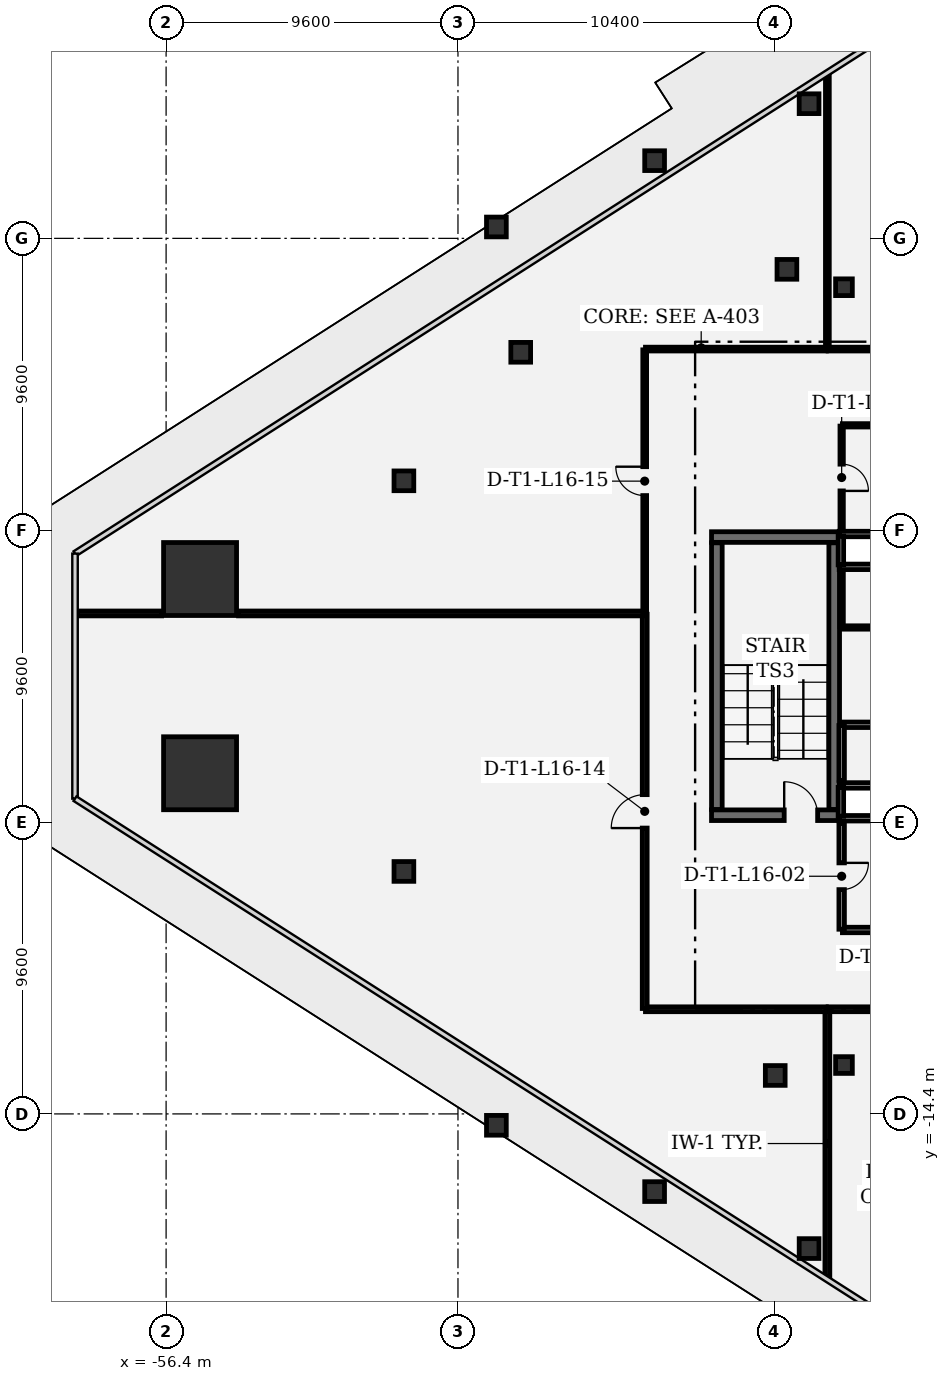
"""IFC4 building model, lengths in metres.
Left out: names, types, materials, properties, quantities, classifications, styles, units other than length and angle.
Written with IfcOpenShell. Run it as: python <this file> out.ifc"""

import sys

from ifc_helpers import new_model, si_unit, direction, frame, frame_2d, origin, origin_2d, place, context, subcontext, project, spatial, rectangle, extrude, element, fill, save


model = new_model("IFC4")
c1 = context("Model", 3, precision=1e-05, world=origin(), true_north=direction((0.0, 1.0)))
c2 = subcontext(c1, "Body", "Model", "MODEL_VIEW")
j1 = project(units=[si_unit("LENGTHUNIT", "METRE"), si_unit("PLANEANGLEUNIT", "RADIAN")], contexts=[c1])
p1 = place(None, origin())
s1 = spatial("IfcSite", under=j1, at=p1, CompositionType="ELEMENT")
p2 = place(p1, origin())
s2 = spatial("IfcBuilding", under=s1, at=p2, CompositionType="ELEMENT")
p3 = place(p2, frame((0.0, 0.0, 74.4)))
s3 = spatial("IfcBuildingStorey", under=s2, at=p3, CompositionType="ELEMENT", Elevation=74.4)
for number, where, z_axis, x_axis in (
    (1, (-55.283, 3.195, 0.0), (0.0, 0.0, 1.0), (1.0, 0.0, 0.0)),
    (2, (-55.283, -3.195, 0.0), (0.0, 0.0, 1.0), (1.0, 0.0, 0.0)),
):
    element("IfcColumn", number, at=place(p3, frame(where, z_axis=z_axis, x_axis=x_axis)), inside=s3, PredefinedType="COLUMN", context=c2, shape_type="SweptSolid", body=[
        extrude(rectangle(XDim=2.4, YDim=2.4, at=origin_2d()), origin(), (0.0, 0.0, 1.0), 4.2),
    ])
for number, where, z_axis, x_axis in (
    (3, (-45.536, 14.775, 0.0), (0.0, 0.0, 1.0), (1.0, 0.0, 0.0)),
    (4, (-45.536, -14.775, 0.0), (0.0, 0.0, 1.0), (1.0, 0.0, 0.0)),
    (5, (-40.333, 16.956, 0.0), (0.0, 0.0, 1.0), (1.0, 0.0, 0.0)),
    (6, (-40.333, -16.956, 0.0), (0.0, 0.0, 1.0), (1.0, 0.0, 0.0)),
    (7, (-35.252, 18.829, 0.0), (0.0, 0.0, 1.0), (1.0, 0.0, 0.0)),
    (8, (-35.252, -18.829, 0.0), (0.0, 0.0, 1.0), (1.0, 0.0, 0.0)),
    (9, (-44.736, 10.652, 0.0), (0.0, 0.0, 1.0), (1.0, 0.0, 0.0)),
    (10, (-48.578, 6.425, 0.0), (0.0, 0.0, 1.0), (1.0, 0.0, 0.0)),
    (11, (-48.578, -6.425, 0.0), (0.0, 0.0, 1.0), (1.0, 0.0, 0.0)),
    (12, (-35.981, 13.381, 0.0), (0.0, 0.0, 1.0), (1.0, 0.0, 0.0)),
    (13, (-36.365, -13.135, 0.0), (0.0, 0.0, 1.0), (1.0, 0.0, 0.0)),
):
    element("IfcColumn", number, at=place(p3, frame(where, z_axis=z_axis, x_axis=x_axis)), inside=s3, PredefinedType="COLUMN", context=c2, shape_type="SweptSolid", body=[
        extrude(rectangle(XDim=0.65, YDim=0.65, at=origin_2d()), origin(), (0.0, 0.0, 1.0), 4.2),
    ])
for number, where, z_axis, x_axis in (
    (14, (-34.104, 12.792, 0.0), (0.0, 0.0, 1.0), (1.0, 0.0, 0.0)),
    (15, (-34.104, -12.792, 0.0), (0.0, 0.0, 1.0), (1.0, 0.0, 0.0)),
):
    element("IfcColumn", number, at=place(p3, frame(where, z_axis=z_axis, x_axis=x_axis)), inside=s3, PredefinedType="COLUMN", context=c2, shape_type="SweptSolid", body=[
        extrude(rectangle(XDim=0.55, YDim=0.55, at=origin_2d()), origin(), (0.0, 0.0, 1.0), 4.2),
    ])
p4 = place(p3, frame((-38.46, -4.575, 0.0), z_axis=(0.0, 0.0, 1.0), x_axis=(1.0, 0.0, 0.0)))
e16 = element("IfcWall", 16, at=p4, inside=s3, PredefinedType="SHEAR", context=c2, shape_type="SweptSolid", body=[
    extrude(rectangle(XDim=4.21, YDim=0.35, at=frame_2d((2.105, 0.0))), origin(), (0.0, 0.0, 1.0), 3.92),
])
p5 = place(p4, frame((2.39, 0.0, 0.0)))
e17 = element("IfcOpeningElement", 17, at=p5, cuts=e16, PredefinedType="OPENING", context=c2, shape_type="SweptSolid", body=[
    extrude(rectangle(XDim=1.1, YDim=2.2, at=frame_2d((0.55, 1.1))), frame((0.0, 0.185, 0.0), z_axis=(0.0, -1.0, 0.0), x_axis=(1.0, 0.0, 0.0)), (0.0, 0.0, 1.0), 0.37),
])
p6 = place(p3, frame((-34.25, 4.575, 0.0), z_axis=(0.0, 0.0, 1.0), x_axis=(-1.0, 0.0, 0.0)))
e18 = element("IfcWall", 18, at=p6, inside=s3, PredefinedType="SHEAR", context=c2, shape_type="SweptSolid", body=[
    extrude(rectangle(XDim=4.21, YDim=0.35, at=frame_2d((2.105, 0.0))), origin(), (0.0, 0.0, 1.0), 3.92),
])
for number, where, z_axis, x_axis in (
    (19, (-34.425, -4.385, 0.0), (0.0, 0.0, 1.0), (0.0, 1.0, 0.0)),
    (20, (-38.285, 4.385, 0.0), (0.0, 0.0, 1.0), (0.0, -1.0, 0.0)),
):
    element("IfcWall", number, at=place(p3, frame(where, z_axis=z_axis, x_axis=x_axis)), inside=s3, PredefinedType="SHEAR", context=c2, shape_type="SweptSolid", body=[
        extrude(rectangle(XDim=8.77, YDim=0.35, at=frame_2d((4.385, 0.0))), origin(), (0.0, 0.0, 1.0), 3.92),
    ])
for number, where, z_axis, x_axis in (
    (21, (-32.99, 3.595, 0.0), (0.0, 0.0, 1.0), (-1.0, 0.0, 0.0)),
    (22, (-34.26, 4.675, 0.0), (0.0, 0.0, 1.0), (1.0, 0.0, 0.0)),
):
    element("IfcWall", number, at=place(p3, frame(where, z_axis=z_axis, x_axis=x_axis)), inside=s3, PredefinedType="PARTITIONING", context=c2, shape_type="SweptSolid", body=[
        extrude(rectangle(XDim=1.27, YDim=0.18, at=frame_2d((0.635, 0.0))), origin(), (0.0, 0.0, 1.0), 3.92),
    ])
p7 = place(p3, frame((-34.205, 3.66, 0.0), z_axis=(0.0, 0.0, 1.0), x_axis=(0.0, 1.0, 0.0)))
e23 = element("IfcWall", 23, at=p7, inside=s3, PredefinedType="PARTITIONING", context=c2, shape_type="SweptSolid", body=[
    extrude(rectangle(XDim=0.95, YDim=0.18, at=frame_2d((0.475, 0.0))), origin(), (0.0, 0.0, 1.0), 3.92),
])
for number, where, z_axis, x_axis in (
    (24, (-32.99, -4.675, 0.0), (0.0, 0.0, 1.0), (-1.0, 0.0, 0.0)),
    (25, (-34.26, -3.595, 0.0), (0.0, 0.0, 1.0), (1.0, 0.0, 0.0)),
):
    element("IfcWall", number, at=place(p3, frame(where, z_axis=z_axis, x_axis=x_axis)), inside=s3, PredefinedType="PARTITIONING", context=c2, shape_type="SweptSolid", body=[
        extrude(rectangle(XDim=1.27, YDim=0.18, at=frame_2d((0.635, 0.0))), origin(), (0.0, 0.0, 1.0), 3.92),
    ])
p8 = place(p3, frame((-34.205, -4.61, 0.0), z_axis=(0.0, 0.0, 1.0), x_axis=(0.0, 1.0, 0.0)))
e26 = element("IfcWall", 26, at=p8, inside=s3, PredefinedType="PARTITIONING", context=c2, shape_type="SweptSolid", body=[
    extrude(rectangle(XDim=0.95, YDim=0.18, at=frame_2d((0.475, 0.0))), origin(), (0.0, 0.0, 1.0), 3.92),
])
for number, where, z_axis, x_axis in (
    (27, (-34.155, 1.6, 0.0), (0.0, 0.0, 1.0), (1.0, 0.0, 0.0)),
    (28, (-30.905, 8.25, 0.0), (0.0, 0.0, 1.0), (-1.0, 0.0, 0.0)),
):
    element("IfcWall", number, at=place(p3, frame(where, z_axis=z_axis, x_axis=x_axis)), inside=s3, PredefinedType="PARTITIONING", context=c2, shape_type="SweptSolid", body=[
        extrude(rectangle(XDim=3.25, YDim=0.11, at=frame_2d((1.625, 0.0))), origin(), (0.0, 0.0, 1.0), 3.92),
    ])
p9 = place(p3, frame((-34.18, 8.225, 0.0), z_axis=(0.0, 0.0, 1.0), x_axis=(0.0, -1.0, 0.0)))
e29 = element("IfcWall", 29, at=p9, inside=s3, PredefinedType="PARTITIONING", context=c2, shape_type="SweptSolid", body=[
    extrude(rectangle(XDim=3.385, YDim=0.11, at=frame_2d((1.692, 0.0))), origin(), (0.0, 0.0, 1.0), 3.92),
])
p10 = place(p9, frame((1.252, 0.0, 0.0)))
e30 = element("IfcOpeningElement", 30, at=p10, cuts=e29, PredefinedType="OPENING", context=c2, shape_type="SweptSolid", body=[
    extrude(rectangle(XDim=0.88, YDim=2.1, at=frame_2d((0.44, 1.05))), frame((0.0, 0.065, 0.0), z_axis=(0.0, -1.0, 0.0), x_axis=(1.0, 0.0, 0.0)), (0.0, 0.0, 1.0), 0.13),
])
p11 = place(p3, frame((-34.18, 3.43, 0.0), z_axis=(0.0, 0.0, 1.0), x_axis=(0.0, -1.0, 0.0)))
e31 = element("IfcWall", 31, at=p11, inside=s3, PredefinedType="PARTITIONING", context=c2, shape_type="SweptSolid", body=[
    extrude(rectangle(XDim=1.805, YDim=0.11, at=frame_2d((0.902, 0.0))), origin(), (0.0, 0.0, 1.0), 3.92),
])
for number, where, z_axis, x_axis in (
    (32, (-34.155, -8.35, 0.0), (0.0, 0.0, 1.0), (1.0, 0.0, 0.0)),
    (33, (-30.905, -1.6, 0.0), (0.0, 0.0, 1.0), (-1.0, 0.0, 0.0)),
):
    element("IfcWall", number, at=place(p3, frame(where, z_axis=z_axis, x_axis=x_axis)), inside=s3, PredefinedType="PARTITIONING", context=c2, shape_type="SweptSolid", body=[
        extrude(rectangle(XDim=3.25, YDim=0.18, at=frame_2d((1.625, 0.0))), origin(), (0.0, 0.0, 1.0), 3.92),
    ])
p12 = place(p3, frame((-34.18, -1.625, 0.0), z_axis=(0.0, 0.0, 1.0), x_axis=(0.0, -1.0, 0.0)))
e34 = element("IfcWall", 34, at=p12, inside=s3, PredefinedType="PARTITIONING", context=c2, shape_type="SweptSolid", body=[
    extrude(rectangle(XDim=1.805, YDim=0.18, at=frame_2d((0.902, 0.0))), origin(), (0.0, 0.0, 1.0), 3.92),
])
p13 = place(p3, frame((-34.18, -4.84, 0.0), z_axis=(0.0, 0.0, 1.0), x_axis=(0.0, -1.0, 0.0)))
e35 = element("IfcWall", 35, at=p13, inside=s3, PredefinedType="PARTITIONING", context=c2, shape_type="SweptSolid", body=[
    extrude(rectangle(XDim=3.485, YDim=0.18, at=frame_2d((1.743, 0.0))), origin(), (0.0, 0.0, 1.0), 3.92),
])
p14 = place(p13, frame((1.302, 0.0, 0.0)))
e36 = element("IfcOpeningElement", 36, at=p14, cuts=e35, PredefinedType="OPENING", context=c2, shape_type="SweptSolid", body=[
    extrude(rectangle(XDim=0.88, YDim=2.1, at=frame_2d((0.44, 1.05))), frame((0.0, 0.1, 0.0), z_axis=(0.0, -1.0, 0.0), x_axis=(1.0, 0.0, 0.0)), (0.0, 0.0, 1.0), 0.2),
])
p15 = place(p3, frame((-34.625, 10.758, 0.0), z_axis=(0.0, 0.0, 1.0), x_axis=(1.0, 0.0, 0.0)))
e37 = element("IfcWall", 37, at=p15, inside=s3, PredefinedType="PARTITIONING", context=c2, shape_type="SweptSolid", body=[
    extrude(rectangle(XDim=9.566, YDim=0.125, at=frame_2d((4.783, 0.0))), origin(), (0.0, 0.0, 1.0), 3.433),
])
p16 = place(p15, frame((4.308, 0.0, 0.0)))
e38 = element("IfcOpeningElement", 38, at=p16, cuts=e37, PredefinedType="OPENING", context=c2, shape_type="SweptSolid", body=[
    extrude(rectangle(XDim=0.95, YDim=2.15, at=frame_2d((0.475, 1.075))), frame((0.0, 0.073, 0.0), z_axis=(0.0, -1.0, 0.0), x_axis=(1.0, 0.0, 0.0)), (0.0, 0.0, 1.0), 0.145),
])
p17 = place(p3, frame((-34.65, 19.766, 0.0), z_axis=(0.0, 0.0, 1.0), x_axis=(0.0, -1.0, 0.0)))
e39 = element("IfcWall", 39, at=p17, inside=s3, PredefinedType="PARTITIONING", context=c2, shape_type="SweptSolid", body=[
    extrude(rectangle(XDim=8.983, YDim=0.125, at=frame_2d((4.492, 0.0))), origin(), (0.0, 0.0, 1.0), 3.92),
])
p18 = place(p3, frame((-29.921, -10.958, 0.0), z_axis=(0.0, 0.0, 1.0), x_axis=(-1.0, 0.0, 0.0)))
e40 = element("IfcWall", 40, at=p18, inside=s3, PredefinedType="PARTITIONING", context=c2, shape_type="SweptSolid", body=[
    extrude(rectangle(XDim=4.704, YDim=0.16, at=frame_2d((2.352, 0.0))), origin(), (0.0, 0.0, 1.0), 3.433),
])
p19 = place(p18, frame((1.802, 0.0, 0.0)))
e41 = element("IfcOpeningElement", 41, at=p19, cuts=e40, PredefinedType="OPENING", context=c2, shape_type="SweptSolid", body=[
    extrude(rectangle(XDim=1.1, YDim=2.15, at=frame_2d((0.55, 1.075))), frame((0.0, 0.09, 0.0), z_axis=(0.0, -1.0, 0.0), x_axis=(1.0, 0.0, 0.0)), (0.0, 0.0, 1.0), 0.18),
])
p20 = place(p3, frame((-34.65, -10.983, 0.0), z_axis=(0.0, 0.0, 1.0), x_axis=(0.0, -1.0, 0.0)))
e42 = element("IfcWall", 42, at=p20, inside=s3, PredefinedType="PARTITIONING", context=c2, shape_type="SweptSolid", body=[
    extrude(rectangle(XDim=8.783, YDim=0.16, at=frame_2d((4.392, 0.0))), origin(), (0.0, 0.0, 1.0), 3.92),
])
p21 = place(p3, frame((-40.633, -10.958, 0.0), z_axis=(0.0, 0.0, 1.0), x_axis=(1.0, 0.0, 0.0)))
e43 = element("IfcWall", 43, at=p21, inside=s3, PredefinedType="PARTITIONING", context=c2, shape_type="SweptSolid", body=[
    extrude(rectangle(XDim=5.95, YDim=0.16, at=frame_2d((2.975, 0.0))), origin(), (0.0, 0.0, 1.0), 3.433),
])
p22 = place(p3, frame((-40.658, -10.933, 0.0), z_axis=(0.0, 0.0, 1.0), x_axis=(0.0, 1.0, 0.0)))
e44 = element("IfcWall", 44, at=p22, inside=s3, PredefinedType="PARTITIONING", context=c2, shape_type="SweptSolid", body=[
    extrude(rectangle(XDim=12.97, YDim=0.16, at=frame_2d((6.485, 0.0))), origin(), (0.0, 0.0, 1.0), 3.92),
])
p23 = place(p22, frame((5.935, 0.0, 0.0)))
e45 = element("IfcOpeningElement", 45, at=p23, cuts=e44, PredefinedType="OPENING", context=c2, shape_type="SweptSolid", body=[
    extrude(rectangle(XDim=1.1, YDim=2.15, at=frame_2d((0.55, 1.075))), frame((0.0, 0.09, 0.0), z_axis=(0.0, -1.0, 0.0), x_axis=(1.0, 0.0, 0.0)), (0.0, 0.0, 1.0), 0.18),
])
p24 = place(p3, frame((-40.683, 2.062, 0.0), z_axis=(0.0, 0.0, 1.0), x_axis=(-1.0, 0.0, 0.0)))
e46 = element("IfcWall", 46, at=p24, inside=s3, PredefinedType="PARTITIONING", context=c2, shape_type="SweptSolid", body=[
    extrude(rectangle(XDim=13.335, YDim=0.16, at=frame_2d((6.667, 0.0))), origin(), (0.0, 0.0, 1.0), 3.92),
])
p25 = place(p3, frame((-56.548, 2.062, 0.0), z_axis=(0.0, 0.0, 1.0), x_axis=(-1.0, 0.0, 0.0)))
e47 = element("IfcWall", 47, at=p25, inside=s3, PredefinedType="PARTITIONING", context=c2, shape_type="SweptSolid", body=[
    extrude(rectangle(XDim=2.768, YDim=0.16, at=frame_2d((1.384, 0.0))), origin(), (0.0, 0.0, 1.0), 3.92),
])
p26 = place(p3, frame((-40.658, 2.095, 0.0), z_axis=(0.0, 0.0, 1.0), x_axis=(0.0, 1.0, 0.0)))
e48 = element("IfcWall", 48, at=p26, inside=s3, PredefinedType="PARTITIONING", context=c2, shape_type="SweptSolid", body=[
    extrude(rectangle(XDim=8.638, YDim=0.125, at=frame_2d((4.319, 0.0))), origin(), (0.0, 0.0, 1.0), 3.92),
])
p27 = place(p26, frame((3.844, 0.0, 0.0)))
e49 = element("IfcOpeningElement", 49, at=p27, cuts=e48, PredefinedType="OPENING", context=c2, shape_type="SweptSolid", body=[
    extrude(rectangle(XDim=0.95, YDim=2.15, at=frame_2d((0.475, 1.075))), frame((0.0, 0.073, 0.0), z_axis=(0.0, -1.0, 0.0), x_axis=(1.0, 0.0, 0.0)), (0.0, 0.0, 1.0), 0.145),
])
p28 = place(p3, frame((-34.683, 10.758, 0.0), z_axis=(0.0, 0.0, 1.0), x_axis=(-1.0, 0.0, 0.0)))
e50 = element("IfcWall", 50, at=p28, inside=s3, PredefinedType="PARTITIONING", context=c2, shape_type="SweptSolid", body=[
    extrude(rectangle(XDim=5.95, YDim=0.125, at=frame_2d((2.975, 0.0))), origin(), (0.0, 0.0, 1.0), 3.433),
])
p29 = place(p5, origin())
e51 = element("IfcDoor", 51, at=p29, inside=s3, OperationType="SINGLE_SWING_LEFT", PredefinedType="DOOR", context=c2, shape_type="SweptSolid", body=[
    extrude(rectangle(XDim=1.1, YDim=2.2, at=frame_2d((0.55, 1.1))), frame((0.0, 0.025, 0.0), z_axis=(0.0, -1.0, 0.0), x_axis=(1.0, 0.0, 0.0)), (0.0, 0.0, 1.0), 0.05),
])
fill(e17, e51)
p30 = place(p10, origin())
e52 = element("IfcDoor", 52, at=p30, inside=s3, OperationType="SINGLE_SWING_RIGHT", PredefinedType="DOOR", context=c2, shape_type="SweptSolid", body=[
    extrude(rectangle(XDim=0.88, YDim=2.1, at=frame_2d((0.44, 1.05))), frame((0.0, 0.025, 0.0), z_axis=(0.0, -1.0, 0.0), x_axis=(1.0, 0.0, 0.0)), (0.0, 0.0, 1.0), 0.05),
])
fill(e30, e52)
p31 = place(p14, origin())
e53 = element("IfcDoor", 53, at=p31, inside=s3, OperationType="SINGLE_SWING_LEFT", PredefinedType="DOOR", context=c2, shape_type="SweptSolid", body=[
    extrude(rectangle(XDim=0.88, YDim=2.1, at=frame_2d((0.44, 1.05))), frame((0.0, 0.025, 0.0), z_axis=(0.0, -1.0, 0.0), x_axis=(1.0, 0.0, 0.0)), (0.0, 0.0, 1.0), 0.05),
])
fill(e36, e53)
p32 = place(p23, origin())
e54 = element("IfcDoor", 54, at=p32, inside=s3, OperationType="SINGLE_SWING_LEFT", PredefinedType="DOOR", context=c2, shape_type="SweptSolid", body=[
    extrude(rectangle(XDim=1.1, YDim=2.15, at=frame_2d((0.55, 1.075))), frame((0.0, 0.025, 0.0), z_axis=(0.0, -1.0, 0.0), x_axis=(1.0, 0.0, 0.0)), (0.0, 0.0, 1.0), 0.05),
])
fill(e45, e54)
p33 = place(p27, origin())
e55 = element("IfcDoor", 55, at=p33, inside=s3, OperationType="SINGLE_SWING_RIGHT", PredefinedType="DOOR", context=c2, shape_type="SweptSolid", body=[
    extrude(rectangle(XDim=0.95, YDim=2.15, at=frame_2d((0.475, 1.075))), frame((0.0, 0.025, 0.0), z_axis=(0.0, -1.0, 0.0), x_axis=(1.0, 0.0, 0.0)), (0.0, 0.0, 1.0), 0.05),
])
fill(e49, e55)
save(model, sys.argv[1])
